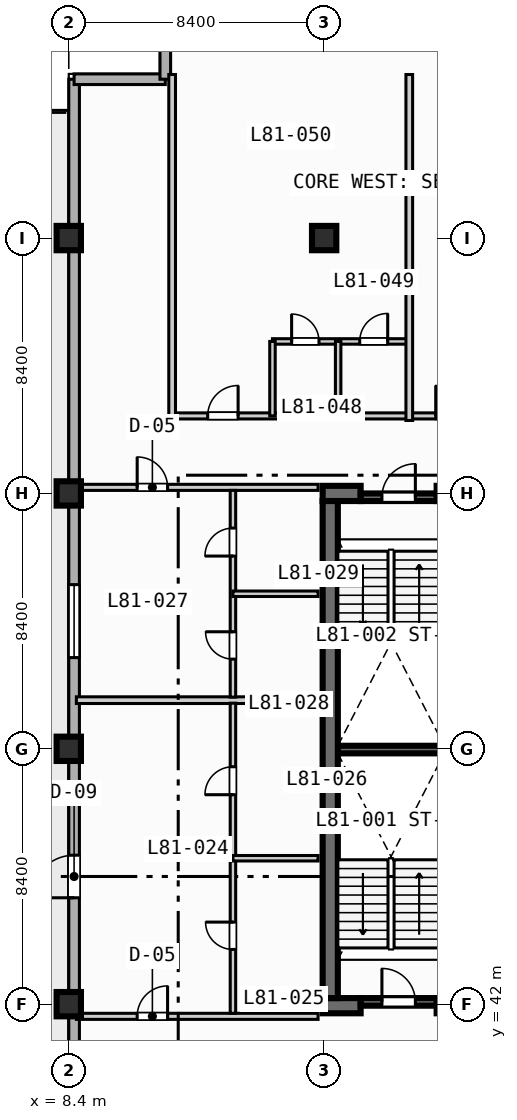
"""IFC4 building model, lengths in metres.
Left out: names, types, materials, properties, quantities, classifications, styles, units other than length and angle.
Written with IfcOpenShell. Run it as: python <this file> out.ifc"""

import sys

from ifc_helpers import new_model, si_unit, direction, frame, frame_2d, origin, origin_2d, place, context, subcontext, project, spatial, rectangle, extrude, element, fill, save


model = new_model("IFC4")
c1 = context("Model", 3, precision=1e-05, world=origin(), true_north=direction((0.0, 1.0)))
c2 = subcontext(c1, "Body", "Model", "MODEL_VIEW")
j1 = project(units=[si_unit("LENGTHUNIT", "METRE"), si_unit("PLANEANGLEUNIT", "RADIAN")], contexts=[c1])
p1 = place(None, origin())
s1 = spatial("IfcSite", under=j1, at=p1, CompositionType="ELEMENT")
p2 = place(p1, origin())
s2 = spatial("IfcBuilding", under=s1, at=p2, CompositionType="ELEMENT")
p3 = place(p2, frame((0.0, 0.0, 328.1)))
s3 = spatial("IfcBuildingStorey", under=s2, at=p3, CompositionType="ELEMENT", Elevation=328.1)
p4 = place(p3, frame((17.25, 50.375, 0.0), z_axis=(0.0, 0.0, 1.0), x_axis=(1.0, 0.0, 0.0)))
e1 = element("IfcWall", 1, at=p4, inside=s3, PredefinedType="SOLIDWALL", context=c2, shape_type="SweptSolid", body=[
    extrude(rectangle(XDim=3.5, YDim=0.25, at=frame_2d((1.75, 0.0))), origin(), (0.0, 0.0, 1.0), 3.67),
])
p5 = place(p3, frame((16.75, 41.95, 0.0), z_axis=(0.0, 0.0, 1.0), x_axis=(1.0, 0.0, 0.0)))
e2 = element("IfcWall", 2, at=p5, inside=s3, PredefinedType="SHEAR", context=c2, shape_type="SweptSolid", body=[
    extrude(rectangle(XDim=1.25, YDim=0.5, at=frame_2d((0.625, 0.0))), origin(), (0.0, 0.0, 1.0), 3.67),
])
p6 = place(p3, frame((20.5, 41.95, 0.0), z_axis=(0.0, 0.0, 1.0), x_axis=(1.0, 0.0, 0.0)))
e3 = element("IfcWall", 3, at=p6, inside=s3, PredefinedType="SHEAR", context=c2, shape_type="SweptSolid", body=[
    extrude(rectangle(XDim=4.95, YDim=0.5, at=frame_2d((2.475, 0.0))), origin(), (0.0, 0.0, 1.0), 3.67),
])
p7 = place(p3, frame((16.75, 58.8, 0.0), z_axis=(0.0, 0.0, 1.0), x_axis=(1.0, 0.0, 0.0)))
e4 = element("IfcWall", 4, at=p7, inside=s3, PredefinedType="SHEAR", context=c2, shape_type="SweptSolid", body=[
    extrude(rectangle(XDim=1.25, YDim=0.5, at=frame_2d((0.625, 0.0))), origin(), (0.0, 0.0, 1.0), 3.67),
])
p8 = place(p3, frame((20.5, 58.8, 0.0), z_axis=(0.0, 0.0, 1.0), x_axis=(1.0, 0.0, 0.0)))
e5 = element("IfcWall", 5, at=p8, inside=s3, PredefinedType="SHEAR", context=c2, shape_type="SweptSolid", body=[
    extrude(rectangle(XDim=4.95, YDim=0.5, at=frame_2d((2.475, 0.0))), origin(), (0.0, 0.0, 1.0), 3.67),
])
p9 = place(p3, frame((17.0, 42.2, 0.0), z_axis=(0.0, 0.0, 1.0), x_axis=(0.0, 1.0, 0.0)))
e6 = element("IfcWall", 6, at=p9, inside=s3, PredefinedType="SHEAR", context=c2, shape_type="SweptSolid", body=[
    extrude(rectangle(XDim=16.35, YDim=0.5, at=frame_2d((8.175, 0.0))), origin(), (0.0, 0.0, 1.0), 3.67),
])
for number, where, z_axis, x_axis in (
    (7, (8.4, 42.0, 0.0), (0.0, 0.0, 1.0), (1.0, 0.0, 0.0)),
    (8, (8.4, 50.4, 0.0), (0.0, 0.0, 1.0), (1.0, 0.0, 0.0)),
    (9, (8.4, 58.8, 0.0), (0.0, 0.0, 1.0), (1.0, 0.0, 0.0)),
    (10, (8.4, 67.2, 0.0), (0.0, 0.0, 1.0), (1.0, 0.0, 0.0)),
    (11, (16.8, 67.2, 0.0), (0.0, 0.0, 1.0), (1.0, 0.0, 0.0)),
):
    element("IfcColumn", number, at=place(p3, frame(where, z_axis=z_axis, x_axis=x_axis)), inside=s3, PredefinedType="COLUMN", context=c2, shape_type="SweptSolid", body=[
        extrude(rectangle(XDim=0.8, YDim=0.8, at=origin_2d()), origin(), (0.0, 0.0, 1.0), 3.9),
    ])
p10 = place(p3, frame((8.575, 11.575, 0.0), z_axis=(0.0, 0.0, 1.0), x_axis=(0.0, 1.0, 0.0)))
e12 = element("IfcWall", 12, at=p10, inside=s3, PredefinedType="STANDARD", context=c2, shape_type="SweptSolid", body=[
    extrude(rectangle(XDim=60.85, YDim=0.35, at=frame_2d((30.425, 0.0))), origin(), (0.0, 0.0, 1.0), 3.67),
])
p11 = place(p10, frame((33.925, 0.0, 0.0)))
e13 = element("IfcOpeningElement", 13, at=p11, cuts=e12, PredefinedType="OPENING", context=c2, shape_type="SweptSolid", body=[
    extrude(rectangle(XDim=1.4, YDim=2.2, at=frame_2d((0.7, 1.1))), frame((0.0, 0.185, 0.0), z_axis=(0.0, -1.0, 0.0), x_axis=(1.0, 0.0, 0.0)), (0.0, 0.0, 1.0), 0.37),
])
p12 = place(p10, frame((16.925, 0.0, 0.85)))
e14 = element("IfcOpeningElement", 14, at=p12, cuts=e12, PredefinedType="OPENING", context=c2, shape_type="SweptSolid", body=[
    extrude(rectangle(XDim=1.8, YDim=1.8, at=frame_2d((0.9, 0.9))), frame((0.0, 0.185, 0.0), z_axis=(0.0, -1.0, 0.0), x_axis=(1.0, 0.0, 0.0)), (0.0, 0.0, 1.0), 0.37),
])
p13 = place(p10, frame((25.025, 0.0, 0.85)))
e15 = element("IfcOpeningElement", 15, at=p13, cuts=e12, PredefinedType="OPENING", context=c2, shape_type="SweptSolid", body=[
    extrude(rectangle(XDim=2.4, YDim=1.95, at=frame_2d((1.2, 0.975))), frame((0.0, 0.185, 0.0), z_axis=(0.0, -1.0, 0.0), x_axis=(1.0, 0.0, 0.0)), (0.0, 0.0, 1.0), 0.37),
])
p14 = place(p10, frame((41.825, 0.0, 0.85)))
e16 = element("IfcOpeningElement", 16, at=p14, cuts=e12, PredefinedType="OPENING", context=c2, shape_type="SweptSolid", body=[
    extrude(rectangle(XDim=2.4, YDim=1.95, at=frame_2d((1.2, 0.975))), frame((0.0, 0.185, 0.0), z_axis=(0.0, -1.0, 0.0), x_axis=(1.0, 0.0, 0.0)), (0.0, 0.0, 1.0), 0.37),
])
for number, where, z_axis, x_axis in (
    (17, (8.575, 72.425, 0.0), (0.0, 0.0, 1.0), (1.0, 0.0, 0.0)),
    (18, (11.575, 72.425, 0.0), (0.0, 0.0, 1.0), (0.0, 1.0, 0.0)),
):
    element("IfcWall", number, at=place(p3, frame(where, z_axis=z_axis, x_axis=x_axis)), inside=s3, PredefinedType="STANDARD", context=c2, shape_type="SweptSolid", body=[
        extrude(rectangle(XDim=3.0, YDim=0.35, at=frame_2d((1.5, 0.0))), origin(), (0.0, 0.0, 1.0), 3.67),
    ])
p15 = place(p3, frame((18.0, 42.075, 0.0), z_axis=(0.0, 0.0, 1.0), x_axis=(1.0, 0.0, 0.0)))
e19 = element("IfcWall", 19, at=p15, inside=s3, PredefinedType="SOLIDWALL", context=c2, shape_type="SweptSolid", body=[
    extrude(rectangle(XDim=2.5, YDim=0.25, at=frame_2d((1.25, 0.0))), origin(), (0.0, 0.0, 1.0), 3.67),
])
p16 = place(p15, frame((0.7, 0.0, 0.0)))
e20 = element("IfcOpeningElement", 20, at=p16, cuts=e19, PredefinedType="OPENING", context=c2, shape_type="SweptSolid", body=[
    extrude(rectangle(XDim=1.1, YDim=2.15, at=frame_2d((0.55, 1.075))), frame((0.0, 0.135, 0.0), z_axis=(0.0, -1.0, 0.0), x_axis=(1.0, 0.0, 0.0)), (0.0, 0.0, 1.0), 0.27),
])
p17 = place(p3, frame((18.0, 58.675, 0.0), z_axis=(0.0, 0.0, 1.0), x_axis=(1.0, 0.0, 0.0)))
e21 = element("IfcWall", 21, at=p17, inside=s3, PredefinedType="SOLIDWALL", context=c2, shape_type="SweptSolid", body=[
    extrude(rectangle(XDim=2.5, YDim=0.25, at=frame_2d((1.25, 0.0))), origin(), (0.0, 0.0, 1.0), 3.67),
])
p18 = place(p17, frame((0.7, 0.0, 0.0)))
e22 = element("IfcOpeningElement", 22, at=p18, cuts=e21, PredefinedType="OPENING", context=c2, shape_type="SweptSolid", body=[
    extrude(rectangle(XDim=1.1, YDim=2.15, at=frame_2d((0.55, 1.075))), frame((0.0, 0.135, 0.0), z_axis=(0.0, -1.0, 0.0), x_axis=(1.0, 0.0, 0.0)), (0.0, 0.0, 1.0), 0.27),
])
p19 = place(p3, frame((8.65, 41.6, 0.0), z_axis=(0.0, 0.0, 1.0), x_axis=(1.0, 0.0, 0.0)))
e23 = element("IfcWall", 23, at=p19, inside=s3, PredefinedType="PARTITIONING", context=c2, shape_type="SweptSolid", body=[
    extrude(rectangle(XDim=7.95, YDim=0.2, at=frame_2d((3.975, 0.0))), origin(), (0.0, 0.0, 1.0), 3.67),
])
p20 = place(p19, frame((2.0, 0.0, 0.0)))
e24 = element("IfcOpeningElement", 24, at=p20, cuts=e23, PredefinedType="OPENING", context=c2, shape_type="SweptSolid", body=[
    extrude(rectangle(XDim=1.0, YDim=2.15, at=frame_2d((0.5, 1.075))), frame((0.0, 0.11, 0.0), z_axis=(0.0, -1.0, 0.0), x_axis=(1.0, 0.0, 0.0)), (0.0, 0.0, 1.0), 0.22),
])
p21 = place(p3, frame((8.65, 59.0, 0.0), z_axis=(0.0, 0.0, 1.0), x_axis=(1.0, 0.0, 0.0)))
e25 = element("IfcWall", 25, at=p21, inside=s3, PredefinedType="PARTITIONING", context=c2, shape_type="SweptSolid", body=[
    extrude(rectangle(XDim=7.95, YDim=0.2, at=frame_2d((3.975, 0.0))), origin(), (0.0, 0.0, 1.0), 3.316),
])
p22 = place(p21, frame((2.0, 0.0, 0.0)))
e26 = element("IfcOpeningElement", 26, at=p22, cuts=e25, PredefinedType="OPENING", context=c2, shape_type="SweptSolid", body=[
    extrude(rectangle(XDim=1.0, YDim=2.15, at=frame_2d((0.5, 1.075))), frame((0.0, 0.11, 0.0), z_axis=(0.0, -1.0, 0.0), x_axis=(1.0, 0.0, 0.0)), (0.0, 0.0, 1.0), 0.22),
])
p23 = place(p3, frame((8.65, 52.0, 0.0), z_axis=(0.0, 0.0, 1.0), x_axis=(1.0, 0.0, 0.0)))
e27 = element("IfcWall", 27, at=p23, inside=s3, PredefinedType="PARTITIONING", context=c2, shape_type="SweptSolid", body=[
    extrude(rectangle(XDim=7.95, YDim=0.22, at=frame_2d((3.975, 0.0))), origin(), (0.0, 0.0, 1.0), 3.67),
])
p24 = place(p3, frame((13.8, 41.7, 0.0), z_axis=(0.0, 0.0, 1.0), x_axis=(0.0, 1.0, 0.0)))
e28 = element("IfcWall", 28, at=p24, inside=s3, PredefinedType="PLUMBINGWALL", context=c2, shape_type="SweptSolid", body=[
    extrude(rectangle(XDim=10.2, YDim=0.18, at=frame_2d((5.1, 0.0))), origin(), (0.0, 0.0, 1.0), 3.67),
])
p25 = place(p24, frame((2.1, 0.0, 0.0)))
e29 = element("IfcOpeningElement", 29, at=p25, cuts=e28, PredefinedType="OPENING", context=c2, shape_type="SweptSolid", body=[
    extrude(rectangle(XDim=0.9, YDim=2.1, at=frame_2d((0.45, 1.05))), frame((0.0, 0.1, 0.0), z_axis=(0.0, -1.0, 0.0), x_axis=(1.0, 0.0, 0.0)), (0.0, 0.0, 1.0), 0.2),
])
p26 = place(p24, frame((7.19, 0.0, 0.0)))
e30 = element("IfcOpeningElement", 30, at=p26, cuts=e28, PredefinedType="OPENING", context=c2, shape_type="SweptSolid", body=[
    extrude(rectangle(XDim=0.92, YDim=2.1, at=frame_2d((0.46, 1.05))), frame((0.0, 0.1, 0.0), z_axis=(0.0, -1.0, 0.0), x_axis=(1.0, 0.0, 0.0)), (0.0, 0.0, 1.0), 0.2),
])
p27 = place(p3, frame((13.8, 46.8, 0.0), z_axis=(0.0, 0.0, 1.0), x_axis=(1.0, 0.0, 0.0)))
e31 = element("IfcWall", 31, at=p27, inside=s3, PredefinedType="PLUMBINGWALL", context=c2, shape_type="SweptSolid", body=[
    extrude(rectangle(XDim=2.8, YDim=0.18, at=frame_2d((1.4, 0.0))), origin(), (0.0, 0.0, 1.0), 3.67),
])
p28 = place(p3, frame((13.8, 52.1, 0.0), z_axis=(0.0, 0.0, 1.0), x_axis=(0.0, 1.0, 0.0)))
e32 = element("IfcWall", 32, at=p28, inside=s3, PredefinedType="PLUMBINGWALL", context=c2, shape_type="SweptSolid", body=[
    extrude(rectangle(XDim=6.8, YDim=0.18, at=frame_2d((3.4, 0.0))), origin(), (0.0, 0.0, 1.0), 3.67),
])
p29 = place(p28, frame((1.25, 0.0, 0.0)))
e33 = element("IfcOpeningElement", 33, at=p29, cuts=e32, PredefinedType="OPENING", context=c2, shape_type="SweptSolid", body=[
    extrude(rectangle(XDim=0.9, YDim=2.1, at=frame_2d((0.45, 1.05))), frame((0.0, 0.1, 0.0), z_axis=(0.0, -1.0, 0.0), x_axis=(1.0, 0.0, 0.0)), (0.0, 0.0, 1.0), 0.2),
])
p30 = place(p28, frame((4.64, 0.0, 0.0)))
e34 = element("IfcOpeningElement", 34, at=p30, cuts=e32, PredefinedType="OPENING", context=c2, shape_type="SweptSolid", body=[
    extrude(rectangle(XDim=0.92, YDim=2.1, at=frame_2d((0.46, 1.05))), frame((0.0, 0.1, 0.0), z_axis=(0.0, -1.0, 0.0), x_axis=(1.0, 0.0, 0.0)), (0.0, 0.0, 1.0), 0.2),
])
p31 = place(p3, frame((13.8, 55.5, 0.0), z_axis=(0.0, 0.0, 1.0), x_axis=(1.0, 0.0, 0.0)))
e35 = element("IfcWall", 35, at=p31, inside=s3, PredefinedType="PLUMBINGWALL", context=c2, shape_type="SweptSolid", body=[
    extrude(rectangle(XDim=2.8, YDim=0.18, at=frame_2d((1.4, 0.0))), origin(), (0.0, 0.0, 1.0), 3.67),
])
p32 = place(p3, frame((11.8, 61.35, 0.0), z_axis=(0.0, 0.0, 1.0), x_axis=(1.0, 0.0, 0.0)))
e36 = element("IfcWall", 36, at=p32, inside=s3, PredefinedType="PARTITIONING", context=c2, shape_type="SweptSolid", body=[
    extrude(rectangle(XDim=21.35, YDim=0.2, at=frame_2d((10.675, 0.0))), origin(), (0.0, 0.0, 1.0), 3.67),
])
p33 = place(p32, frame((1.17, 0.0, 0.0)))
e37 = element("IfcOpeningElement", 37, at=p33, cuts=e36, PredefinedType="OPENING", context=c2, shape_type="SweptSolid", body=[
    extrude(rectangle(XDim=1.0, YDim=2.15, at=frame_2d((0.5, 1.075))), frame((0.0, 0.11, 0.0), z_axis=(0.0, -1.0, 0.0), x_axis=(1.0, 0.0, 0.0)), (0.0, 0.0, 1.0), 0.22),
])
p34 = place(p32, frame((8.67, 0.0, 0.0)))
e38 = element("IfcOpeningElement", 38, at=p34, cuts=e36, PredefinedType="OPENING", context=c2, shape_type="SweptSolid", body=[
    extrude(rectangle(XDim=1.0, YDim=2.15, at=frame_2d((0.5, 1.075))), frame((0.0, 0.11, 0.0), z_axis=(0.0, -1.0, 0.0), x_axis=(1.0, 0.0, 0.0)), (0.0, 0.0, 1.0), 0.22),
])
p35 = place(p32, frame((15.445, 0.0, 0.0)))
e39 = element("IfcOpeningElement", 39, at=p35, cuts=e36, PredefinedType="OPENING", context=c2, shape_type="SweptSolid", body=[
    extrude(rectangle(XDim=1.0, YDim=2.15, at=frame_2d((0.5, 1.075))), frame((0.0, 0.11, 0.0), z_axis=(0.0, -1.0, 0.0), x_axis=(1.0, 0.0, 0.0)), (0.0, 0.0, 1.0), 0.22),
])
p36 = place(p3, frame((11.8, 61.2, 0.0), z_axis=(0.0, 0.0, 1.0), x_axis=(0.0, 1.0, 0.0)))
e40 = element("IfcWall", 40, at=p36, inside=s3, PredefinedType="PARTITIONING", context=c2, shape_type="SweptSolid", body=[
    extrude(rectangle(XDim=11.38, YDim=0.22, at=frame_2d((5.69, 0.0))), origin(), (0.0, 0.0, 1.0), 3.67),
])
p37 = place(p3, frame((15.1, 63.8, 0.0), z_axis=(0.0, 0.0, 1.0), x_axis=(1.0, 0.0, 0.0)))
e41 = element("IfcWall", 41, at=p37, inside=s3, PredefinedType="PLUMBINGWALL", context=c2, shape_type="SweptSolid", body=[
    extrude(rectangle(XDim=4.5, YDim=0.18, at=frame_2d((2.25, 0.0))), origin(), (0.0, 0.0, 1.0), 3.67),
])
p38 = place(p37, frame((0.63, 0.0, 0.0)))
e42 = element("IfcOpeningElement", 42, at=p38, cuts=e41, PredefinedType="OPENING", context=c2, shape_type="SweptSolid", body=[
    extrude(rectangle(XDim=0.9, YDim=2.1, at=frame_2d((0.45, 1.05))), frame((0.0, 0.1, 0.0), z_axis=(0.0, -1.0, 0.0), x_axis=(1.0, 0.0, 0.0)), (0.0, 0.0, 1.0), 0.2),
])
p39 = place(p37, frame((2.87, 0.0, 0.0)))
e43 = element("IfcOpeningElement", 43, at=p39, cuts=e41, PredefinedType="OPENING", context=c2, shape_type="SweptSolid", body=[
    extrude(rectangle(XDim=0.92, YDim=2.1, at=frame_2d((0.46, 1.05))), frame((0.0, 0.1, 0.0), z_axis=(0.0, -1.0, 0.0), x_axis=(1.0, 0.0, 0.0)), (0.0, 0.0, 1.0), 0.2),
])
for number, where, z_axis, x_axis in (
    (44, (15.1, 61.35, 0.0), (0.0, 0.0, 1.0), (0.0, 1.0, 0.0)),
    (45, (17.26, 61.35, 0.0), (0.0, 0.0, 1.0), (0.0, 1.0, 0.0)),
):
    element("IfcWall", number, at=place(p3, frame(where, z_axis=z_axis, x_axis=x_axis)), inside=s3, PredefinedType="PLUMBINGWALL", context=c2, shape_type="SweptSolid", body=[
        extrude(rectangle(XDim=2.45, YDim=0.18, at=frame_2d((1.225, 0.0))), origin(), (0.0, 0.0, 1.0), 3.67),
    ])
p40 = place(p3, frame((19.6, 61.2, 0.0), z_axis=(0.0, 0.0, 1.0), x_axis=(0.0, 1.0, 0.0)))
e46 = element("IfcWall", 46, at=p40, inside=s3, PredefinedType="PARTITIONING", context=c2, shape_type="SweptSolid", body=[
    extrude(rectangle(XDim=11.38, YDim=0.22, at=frame_2d((5.69, 0.0))), origin(), (0.0, 0.0, 1.0), 3.67),
])
p41 = place(p11, origin())
e47 = element("IfcDoor", 47, at=p41, inside=s3, OperationType="SINGLE_SWING_LEFT", PredefinedType="DOOR", context=c2, shape_type="SweptSolid", body=[
    extrude(rectangle(XDim=1.4, YDim=2.2, at=frame_2d((0.7, 1.1))), frame((0.0, 0.025, 0.0), z_axis=(0.0, -1.0, 0.0), x_axis=(1.0, 0.0, 0.0)), (0.0, 0.0, 1.0), 0.05),
])
fill(e13, e47)
p42 = place(p14, origin())
e48 = element("IfcWindow", 48, at=p42, inside=s3, PartitioningType="SINGLE_PANEL", PredefinedType="WINDOW", context=c2, shape_type="SweptSolid", body=[
    extrude(rectangle(XDim=2.4, YDim=1.95, at=frame_2d((1.2, 0.975))), frame((0.0, 0.03, 0.0), z_axis=(0.0, -1.0, 0.0), x_axis=(1.0, 0.0, 0.0)), (0.0, 0.0, 1.0), 0.06),
])
fill(e16, e48)
p43 = place(p16, origin())
e49 = element("IfcDoor", 49, at=p43, inside=s3, OperationType="SINGLE_SWING_LEFT", PredefinedType="DOOR", context=c2, shape_type="SweptSolid", body=[
    extrude(rectangle(XDim=1.1, YDim=2.15, at=frame_2d((0.55, 1.075))), frame((0.0, 0.025, 0.0), z_axis=(0.0, -1.0, 0.0), x_axis=(1.0, 0.0, 0.0)), (0.0, 0.0, 1.0), 0.05),
])
fill(e20, e49)
p44 = place(p18, origin())
e50 = element("IfcDoor", 50, at=p44, inside=s3, OperationType="SINGLE_SWING_RIGHT", PredefinedType="DOOR", context=c2, shape_type="SweptSolid", body=[
    extrude(rectangle(XDim=1.1, YDim=2.15, at=frame_2d((0.55, 1.075))), frame((0.0, 0.025, 0.0), z_axis=(0.0, -1.0, 0.0), x_axis=(1.0, 0.0, 0.0)), (0.0, 0.0, 1.0), 0.05),
])
fill(e22, e50)
p45 = place(p20, origin())
e51 = element("IfcDoor", 51, at=p45, inside=s3, OperationType="SINGLE_SWING_RIGHT", PredefinedType="DOOR", context=c2, shape_type="SweptSolid", body=[
    extrude(rectangle(XDim=1.0, YDim=2.15, at=frame_2d((0.5, 1.075))), frame((0.0, 0.025, 0.0), z_axis=(0.0, -1.0, 0.0), x_axis=(1.0, 0.0, 0.0)), (0.0, 0.0, 1.0), 0.05),
])
fill(e24, e51)
p46 = place(p22, origin())
e52 = element("IfcDoor", 52, at=p46, inside=s3, OperationType="SINGLE_SWING_LEFT", PredefinedType="DOOR", context=c2, shape_type="SweptSolid", body=[
    extrude(rectangle(XDim=1.0, YDim=2.15, at=frame_2d((0.5, 1.075))), frame((0.0, 0.025, 0.0), z_axis=(0.0, -1.0, 0.0), x_axis=(1.0, 0.0, 0.0)), (0.0, 0.0, 1.0), 0.05),
])
fill(e26, e52)
p47 = place(p25, origin())
e53 = element("IfcDoor", 53, at=p47, inside=s3, OperationType="SINGLE_SWING_RIGHT", PredefinedType="DOOR", context=c2, shape_type="SweptSolid", body=[
    extrude(rectangle(XDim=0.9, YDim=2.1, at=frame_2d((0.45, 1.05))), frame((0.0, 0.025, 0.0), z_axis=(0.0, -1.0, 0.0), x_axis=(1.0, 0.0, 0.0)), (0.0, 0.0, 1.0), 0.05),
])
fill(e29, e53)
p48 = place(p26, origin())
e54 = element("IfcDoor", 54, at=p48, inside=s3, OperationType="SINGLE_SWING_LEFT", PredefinedType="DOOR", context=c2, shape_type="SweptSolid", body=[
    extrude(rectangle(XDim=0.92, YDim=2.1, at=frame_2d((0.46, 1.05))), frame((0.0, 0.025, 0.0), z_axis=(0.0, -1.0, 0.0), x_axis=(1.0, 0.0, 0.0)), (0.0, 0.0, 1.0), 0.05),
])
fill(e30, e54)
p49 = place(p29, origin())
e55 = element("IfcDoor", 55, at=p49, inside=s3, OperationType="SINGLE_SWING_RIGHT", PredefinedType="DOOR", context=c2, shape_type="SweptSolid", body=[
    extrude(rectangle(XDim=0.9, YDim=2.1, at=frame_2d((0.45, 1.05))), frame((0.0, 0.025, 0.0), z_axis=(0.0, -1.0, 0.0), x_axis=(1.0, 0.0, 0.0)), (0.0, 0.0, 1.0), 0.05),
])
fill(e33, e55)
p50 = place(p30, origin())
e56 = element("IfcDoor", 56, at=p50, inside=s3, OperationType="SINGLE_SWING_LEFT", PredefinedType="DOOR", context=c2, shape_type="SweptSolid", body=[
    extrude(rectangle(XDim=0.92, YDim=2.1, at=frame_2d((0.46, 1.05))), frame((0.0, 0.025, 0.0), z_axis=(0.0, -1.0, 0.0), x_axis=(1.0, 0.0, 0.0)), (0.0, 0.0, 1.0), 0.05),
])
fill(e34, e56)
p51 = place(p33, origin())
e57 = element("IfcDoor", 57, at=p51, inside=s3, OperationType="SINGLE_SWING_RIGHT", PredefinedType="DOOR", context=c2, shape_type="SweptSolid", body=[
    extrude(rectangle(XDim=1.0, YDim=2.15, at=frame_2d((0.5, 1.075))), frame((0.0, 0.025, 0.0), z_axis=(0.0, -1.0, 0.0), x_axis=(1.0, 0.0, 0.0)), (0.0, 0.0, 1.0), 0.05),
])
fill(e37, e57)
p52 = place(p34, origin())
e58 = element("IfcDoor", 58, at=p52, inside=s3, OperationType="SINGLE_SWING_LEFT", PredefinedType="DOOR", context=c2, shape_type="SweptSolid", body=[
    extrude(rectangle(XDim=1.0, YDim=2.15, at=frame_2d((0.5, 1.075))), frame((0.0, 0.025, 0.0), z_axis=(0.0, -1.0, 0.0), x_axis=(1.0, 0.0, 0.0)), (0.0, 0.0, 1.0), 0.05),
])
fill(e38, e58)
p53 = place(p38, origin())
e59 = element("IfcDoor", 59, at=p53, inside=s3, OperationType="SINGLE_SWING_LEFT", PredefinedType="DOOR", context=c2, shape_type="SweptSolid", body=[
    extrude(rectangle(XDim=0.9, YDim=2.1, at=frame_2d((0.45, 1.05))), frame((0.0, 0.025, 0.0), z_axis=(0.0, -1.0, 0.0), x_axis=(1.0, 0.0, 0.0)), (0.0, 0.0, 1.0), 0.05),
])
fill(e42, e59)
p54 = place(p39, origin())
e60 = element("IfcDoor", 60, at=p54, inside=s3, OperationType="SINGLE_SWING_RIGHT", PredefinedType="DOOR", context=c2, shape_type="SweptSolid", body=[
    extrude(rectangle(XDim=0.92, YDim=2.1, at=frame_2d((0.46, 1.05))), frame((0.0, 0.025, 0.0), z_axis=(0.0, -1.0, 0.0), x_axis=(1.0, 0.0, 0.0)), (0.0, 0.0, 1.0), 0.05),
])
fill(e43, e60)
save(model, sys.argv[1])
